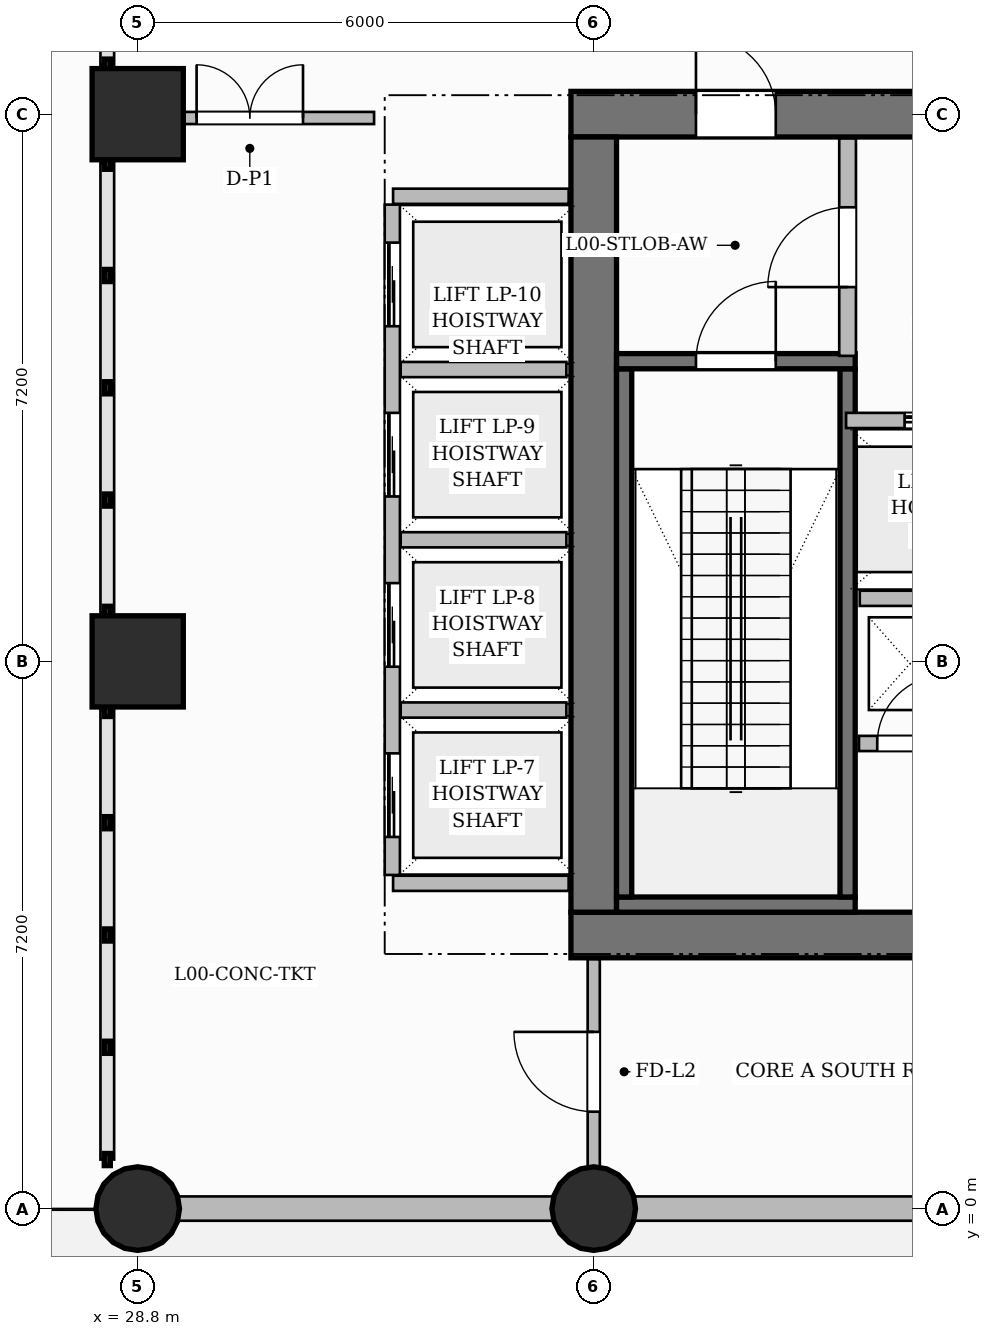
"""IFC4 building model, lengths in metres.
Left out: names, types, materials, properties, quantities, classifications, styles, units other than length and angle.
Written with IfcOpenShell. Run it as: python <this file> out.ifc"""

import sys

from ifc_helpers import new_model, si_unit, direction, frame, frame_2d, origin, origin_2d, place, context, subcontext, project, spatial, rectangle, circle, extrude, source, transform, mapped, element, fill, save


model = new_model("IFC4")
c1 = context("Model", 3, precision=1e-05, world=origin(), true_north=direction((0.0, 1.0)))
c2 = subcontext(c1, "Body", "Model", "MODEL_VIEW")
j1 = project(units=[si_unit("LENGTHUNIT", "METRE"), si_unit("PLANEANGLEUNIT", "RADIAN")], contexts=[c1])
p1 = place(None, origin())
s1 = spatial("IfcSite", under=j1, at=p1, CompositionType="ELEMENT")
p2 = place(p1, origin())
s2 = spatial("IfcBuilding", under=s1, at=p2, CompositionType="ELEMENT")
p3 = place(p2, origin())
s3 = spatial("IfcBuildingStorey", under=s2, at=p3, CompositionType="ELEMENT", Elevation=0.0)
p4 = place(p3, frame((34.5, 3.6, 0.0), z_axis=(0.0, 0.0, 1.0), x_axis=(1.0, 0.0, 0.0)))
e1 = element("IfcWall", 1, at=p4, inside=s3, PredefinedType="SHEAR", context=c2, shape_type="SweptSolid", body=[
    extrude(rectangle(XDim=15.6, YDim=0.6, at=frame_2d((7.8, 0.0))), origin(), (0.0, 0.0, 1.0), 5.4),
])
p5 = place(p4, frame((4.77, 0.0, 0.0)))
e2 = element("IfcOpeningElement", 2, at=p5, cuts=e1, PredefinedType="OPENING", context=c2, shape_type="SweptSolid", body=[
    extrude(rectangle(XDim=0.9, YDim=2.1, at=frame_2d((0.45, 1.05))), frame((0.0, 0.31, 0.0), z_axis=(0.0, -1.0, 0.0), x_axis=(1.0, 0.0, 0.0)), (0.0, 0.0, 1.0), 0.62),
])
p6 = place(p4, frame((7.15, 0.0, 0.0)))
e3 = element("IfcOpeningElement", 3, at=p6, cuts=e1, PredefinedType="OPENING", context=c2, shape_type="SweptSolid", body=[
    extrude(rectangle(XDim=0.9, YDim=2.1, at=frame_2d((0.45, 1.05))), frame((0.0, 0.31, 0.0), z_axis=(0.0, -1.0, 0.0), x_axis=(1.0, 0.0, 0.0)), (0.0, 0.0, 1.0), 0.62),
])
p7 = place(p3, frame((34.5, 14.4, 0.0), z_axis=(0.0, 0.0, 1.0), x_axis=(1.0, 0.0, 0.0)))
e4 = element("IfcWall", 4, at=p7, inside=s3, PredefinedType="SHEAR", context=c2, shape_type="SweptSolid", body=[
    extrude(rectangle(XDim=15.6, YDim=0.6, at=frame_2d((7.8, 0.0))), origin(), (0.0, 0.0, 1.0), 5.4),
])
p8 = place(p7, frame((5.43, 0.0, 0.0)))
e5 = element("IfcOpeningElement", 5, at=p8, cuts=e4, PredefinedType="OPENING", context=c2, shape_type="SweptSolid", body=[
    extrude(rectangle(XDim=1.5, YDim=2.2, at=frame_2d((0.75, 1.1))), frame((0.0, 0.31, 0.0), z_axis=(0.0, -1.0, 0.0), x_axis=(1.0, 0.0, 0.0)), (0.0, 0.0, 1.0), 0.62),
])
p9 = place(p7, frame((1.645, 0.0, 0.0)))
e6 = element("IfcOpeningElement", 6, at=p9, cuts=e4, PredefinedType="OPENING", context=c2, shape_type="SweptSolid", body=[
    extrude(rectangle(XDim=1.05, YDim=2.15, at=frame_2d((0.525, 1.075))), frame((0.0, 0.31, 0.0), z_axis=(0.0, -1.0, 0.0), x_axis=(1.0, 0.0, 0.0)), (0.0, 0.0, 1.0), 0.62),
])
p10 = place(p7, frame((11.275, 0.0, 0.0)))
e7 = element("IfcOpeningElement", 7, at=p10, cuts=e4, PredefinedType="OPENING", context=c2, shape_type="SweptSolid", body=[
    extrude(rectangle(XDim=1.05, YDim=2.15, at=frame_2d((0.525, 1.075))), frame((0.0, 0.31, 0.0), z_axis=(0.0, -1.0, 0.0), x_axis=(1.0, 0.0, 0.0)), (0.0, 0.0, 1.0), 0.62),
])
p11 = place(p3, frame((34.8, 3.9, 0.0), z_axis=(0.0, 0.0, 1.0), x_axis=(0.0, 1.0, 0.0)))
e8 = element("IfcWall", 8, at=p11, inside=s3, PredefinedType="SHEAR", context=c2, shape_type="SweptSolid", body=[
    extrude(rectangle(XDim=10.2, YDim=0.6, at=frame_2d((5.1, 0.0))), origin(), (0.0, 0.0, 1.0), 5.4),
])
m1 = source(origin(), c2, "Body", "SweptSolid", [
    extrude(circle(Radius=0.55, at=origin_2d()), origin(), (0.0, 0.0, 1.0), 5.4),
])
p12 = place(p3, frame((28.8, 0.0, 0.0), z_axis=(0.0, 0.0, 1.0), x_axis=(1.0, 0.0, 0.0)))
e9 = element("IfcColumn", 9, at=p12, inside=s3, PredefinedType="COLUMN", context=c2, shape_type="MappedRepresentation", body=[
    mapped(m1, transform((0.0, 0.0, 0.0), scale=1.0)),
])
m2 = source(origin(), c2, "Body", "SweptSolid", [
    extrude(rectangle(XDim=1.2, YDim=1.2, at=origin_2d()), origin(), (0.0, 0.0, 1.0), 5.4),
])
for number, where, z_axis, x_axis in (
    (10, (28.8, 7.2, 0.0), (0.0, 0.0, 1.0), (1.0, 0.0, 0.0)),
    (11, (28.8, 14.4, 0.0), (0.0, 0.0, 1.0), (1.0, 0.0, 0.0)),
):
    element("IfcColumn", number, at=place(p3, frame(where, z_axis=z_axis, x_axis=x_axis)), inside=s3, PredefinedType="COLUMN", context=c2, shape_type="MappedRepresentation", body=[
        mapped(m2, transform((0.0, 0.0, 0.0), scale=1.0)),
    ])
p13 = place(p3, frame((34.8, 0.0, 0.0), z_axis=(0.0, 0.0, 1.0), x_axis=(1.0, 0.0, 0.0)))
e12 = element("IfcColumn", 12, at=p13, inside=s3, PredefinedType="COLUMN", context=c2, shape_type="MappedRepresentation", body=[
    mapped(m1, transform((0.0, 0.0, 0.0), scale=1.0)),
])
p14 = place(p3, frame((35.1, 4.0, 0.0), z_axis=(0.0, 0.0, 1.0), x_axis=(1.0, 0.0, 0.0)))
e13 = element("IfcWall", 13, at=p14, inside=s3, PredefinedType="SHEAR", context=c2, shape_type="SweptSolid", body=[
    extrude(rectangle(XDim=3.14, YDim=0.2, at=frame_2d((1.57, 0.0))), origin(), (0.0, 0.0, 1.0), 5.4),
])
for number, where, z_axis, x_axis in (
    (14, (35.2, 4.1, 0.0), (0.0, 0.0, 1.0), (0.0, 1.0, 0.0)),
    (15, (38.14, 4.1, 0.0), (0.0, 0.0, 1.0), (0.0, 1.0, 0.0)),
):
    element("IfcWall", number, at=place(p3, frame(where, z_axis=z_axis, x_axis=x_axis)), inside=s3, PredefinedType="SHEAR", context=c2, shape_type="SweptSolid", body=[
        extrude(rectangle(XDim=6.95, YDim=0.2, at=frame_2d((3.475, 0.0))), origin(), (0.0, 0.0, 1.0), 5.4),
    ])
p15 = place(p3, frame((35.1, 11.15, 0.0), z_axis=(0.0, 0.0, 1.0), x_axis=(1.0, 0.0, 0.0)))
e16 = element("IfcWall", 16, at=p15, inside=s3, PredefinedType="SHEAR", context=c2, shape_type="SweptSolid", body=[
    extrude(rectangle(XDim=3.14, YDim=0.2, at=frame_2d((1.57, 0.0))), origin(), (0.0, 0.0, 1.0), 5.4),
])
p16 = place(p15, frame((1.045, 0.0, 0.0)))
e17 = element("IfcOpeningElement", 17, at=p16, cuts=e16, PredefinedType="OPENING", context=c2, shape_type="SweptSolid", body=[
    extrude(rectangle(XDim=1.05, YDim=2.2, at=frame_2d((0.525, 1.1))), frame((0.0, 0.11, 0.0), z_axis=(0.0, -1.0, 0.0), x_axis=(1.0, 0.0, 0.0)), (0.0, 0.0, 1.0), 0.22),
])
p17 = place(p3, frame((38.3, 8.03, 0.0), z_axis=(0.0, 0.0, 1.0), x_axis=(1.0, 0.0, 0.0)))
e18 = element("IfcWall", 18, at=p17, inside=s3, PredefinedType="PARTITIONING", context=c2, shape_type="SweptSolid", body=[
    extrude(rectangle(XDim=4.74, YDim=0.2, at=frame_2d((2.37, 0.0))), origin(), (0.0, 0.0, 1.0), 5.1),
])
p18 = place(p3, frame((38.14, 11.22, 0.0), z_axis=(0.0, 0.0, 1.0), x_axis=(0.0, 1.0, 0.0)))
e19 = element("IfcWall", 19, at=p18, inside=s3, PredefinedType="PARTITIONING", context=c2, shape_type="SweptSolid", body=[
    extrude(rectangle(XDim=2.86, YDim=0.22, at=frame_2d((1.43, 0.0))), origin(), (0.0, 0.0, 1.0), 5.1),
])
p19 = place(p18, frame((0.905, 0.0, 0.0)))
e20 = element("IfcOpeningElement", 20, at=p19, cuts=e19, PredefinedType="OPENING", context=c2, shape_type="SweptSolid", body=[
    extrude(rectangle(XDim=1.05, YDim=2.15, at=frame_2d((0.525, 1.075))), frame((0.0, 0.12, 0.0), z_axis=(0.0, -1.0, 0.0), x_axis=(1.0, 0.0, 0.0)), (0.0, 0.0, 1.0), 0.24),
])
p20 = place(p3, frame((38.29, 6.12, 0.0), z_axis=(0.0, 0.0, 1.0), x_axis=(1.0, 0.0, 0.0)))
e21 = element("IfcWall", 21, at=p20, inside=s3, PredefinedType="PARTITIONING", context=c2, shape_type="SweptSolid", body=[
    extrude(rectangle(XDim=1.38, YDim=0.2, at=frame_2d((0.69, 0.0))), origin(), (0.0, 0.0, 1.0), 5.1),
])
p21 = place(p20, frame((0.24, 0.0, 0.0)))
e22 = element("IfcOpeningElement", 22, at=p21, cuts=e21, PredefinedType="OPENING", context=c2, shape_type="SweptSolid", body=[
    extrude(rectangle(XDim=0.9, YDim=2.1, at=frame_2d((0.45, 1.05))), frame((0.0, 0.11, 0.0), z_axis=(0.0, -1.0, 0.0), x_axis=(1.0, 0.0, 0.0)), (0.0, 0.0, 1.0), 0.22),
])
for number, where, z_axis, x_axis in (
    (23, (32.16, 4.28, 0.0), (0.0, 0.0, 1.0), (1.0, 0.0, 0.0)),
    (24, (32.16, 13.32, 0.0), (0.0, 0.0, 1.0), (1.0, 0.0, 0.0)),
):
    element("IfcWall", number, at=place(p3, frame(where, z_axis=z_axis, x_axis=x_axis)), inside=s3, PredefinedType="PARTITIONING", context=c2, shape_type="SweptSolid", body=[
        extrude(rectangle(XDim=2.31, YDim=0.2, at=frame_2d((1.155, 0.0))), origin(), (0.0, 0.0, 1.0), 5.1),
    ])
p22 = place(p3, frame((32.15, 4.39, 0.0), z_axis=(0.0, 0.0, 1.0), x_axis=(0.0, 1.0, 0.0)))
e25 = element("IfcWall", 25, at=p22, inside=s3, PredefinedType="PARTITIONING", context=c2, shape_type="SweptSolid", body=[
    extrude(rectangle(XDim=8.82, YDim=0.2, at=frame_2d((4.41, 0.0))), origin(), (0.0, 0.0, 1.0), 5.1),
])
p23 = place(p22, frame((0.5, 0.0, 0.0)))
e26 = element("IfcOpeningElement", 26, at=p23, cuts=e25, PredefinedType="OPENING", context=c2, shape_type="SweptSolid", body=[
    extrude(rectangle(XDim=1.1, YDim=2.2, at=frame_2d((0.55, 1.1))), frame((0.0, 0.11, 0.0), z_axis=(0.0, -1.0, 0.0), x_axis=(1.0, 0.0, 0.0)), (0.0, 0.0, 1.0), 0.22),
])
p24 = place(p22, frame((2.74, 0.0, 0.0)))
e27 = element("IfcOpeningElement", 27, at=p24, cuts=e25, PredefinedType="OPENING", context=c2, shape_type="SweptSolid", body=[
    extrude(rectangle(XDim=1.1, YDim=2.2, at=frame_2d((0.55, 1.1))), frame((0.0, 0.11, 0.0), z_axis=(0.0, -1.0, 0.0), x_axis=(1.0, 0.0, 0.0)), (0.0, 0.0, 1.0), 0.22),
])
p25 = place(p22, frame((4.98, 0.0, 0.0)))
e28 = element("IfcOpeningElement", 28, at=p25, cuts=e25, PredefinedType="OPENING", context=c2, shape_type="SweptSolid", body=[
    extrude(rectangle(XDim=1.1, YDim=2.2, at=frame_2d((0.55, 1.1))), frame((0.0, 0.11, 0.0), z_axis=(0.0, -1.0, 0.0), x_axis=(1.0, 0.0, 0.0)), (0.0, 0.0, 1.0), 0.22),
])
p26 = place(p22, frame((7.22, 0.0, 0.0)))
e29 = element("IfcOpeningElement", 29, at=p26, cuts=e25, PredefinedType="OPENING", context=c2, shape_type="SweptSolid", body=[
    extrude(rectangle(XDim=1.1, YDim=2.2, at=frame_2d((0.55, 1.1))), frame((0.0, 0.11, 0.0), z_axis=(0.0, -1.0, 0.0), x_axis=(1.0, 0.0, 0.0)), (0.0, 0.0, 1.0), 0.22),
])
for number, where, z_axis, x_axis in (
    (30, (32.26, 6.56, 0.0), (0.0, 0.0, 1.0), (1.0, 0.0, 0.0)),
    (31, (32.26, 8.8, 0.0), (0.0, 0.0, 1.0), (1.0, 0.0, 0.0)),
    (32, (32.26, 11.04, 0.0), (0.0, 0.0, 1.0), (1.0, 0.0, 0.0)),
):
    element("IfcWall", number, at=place(p3, frame(where, z_axis=z_axis, x_axis=x_axis)), inside=s3, PredefinedType="PARTITIONING", context=c2, shape_type="SweptSolid", body=[
        extrude(rectangle(XDim=2.18, YDim=0.2, at=frame_2d((1.09, 0.0))), origin(), (0.0, 0.0, 1.0), 5.1),
    ])
p27 = place(p3, frame((34.8, 0.32, 0.0), z_axis=(0.0, 0.0, 1.0), x_axis=(0.0, 1.0, 0.0)))
e33 = element("IfcWall", 33, at=p27, inside=s3, PredefinedType="PARTITIONING", context=c2, shape_type="SweptSolid", body=[
    extrude(rectangle(XDim=2.96, YDim=0.16, at=frame_2d((1.48, 0.0))), origin(), (0.0, 0.0, 1.0), 5.1),
])
p28 = place(p27, frame((0.955, 0.0, 0.0)))
e34 = element("IfcOpeningElement", 34, at=p28, cuts=e33, PredefinedType="OPENING", context=c2, shape_type="SweptSolid", body=[
    extrude(rectangle(XDim=1.05, YDim=2.15, at=frame_2d((0.525, 1.075))), frame((0.0, 0.09, 0.0), z_axis=(0.0, -1.0, 0.0), x_axis=(1.0, 0.0, 0.0)), (0.0, 0.0, 1.0), 0.18),
])
p29 = place(p3, frame((28.64, 14.35, 0.0), z_axis=(0.0, 0.0, 1.0), x_axis=(1.0, 0.0, 0.0)))
e35 = element("IfcWall", 35, at=p29, inside=s3, PredefinedType="PARTITIONING", context=c2, shape_type="SweptSolid", body=[
    extrude(rectangle(XDim=3.27, YDim=0.16, at=frame_2d((1.635, 0.0))), origin(), (0.0, 0.0, 1.0), 4.085),
])
p30 = place(p29, frame((0.935, 0.0, 0.0)))
e36 = element("IfcOpeningElement", 36, at=p30, cuts=e35, PredefinedType="OPENING", context=c2, shape_type="SweptSolid", body=[
    extrude(rectangle(XDim=1.4, YDim=2.35, at=frame_2d((0.7, 1.175))), frame((0.0, 0.09, 0.0), z_axis=(0.0, -1.0, 0.0), x_axis=(1.0, 0.0, 0.0)), (0.0, 0.0, 1.0), 0.18),
])
p31 = place(p3, frame((38.12, 10.37, 0.0), z_axis=(0.0, 0.0, 1.0), x_axis=(1.0, 0.0, 0.0)))
e37 = element("IfcWall", 37, at=p31, inside=s3, PredefinedType="PARTITIONING", context=c2, shape_type="SweptSolid", body=[
    extrude(rectangle(XDim=2.64, YDim=0.2, at=frame_2d((1.32, 0.0))), origin(), (0.0, 0.0, 1.0), 5.1),
])
p32 = place(p31, frame((0.77, 0.0, 0.0)))
e38 = element("IfcOpeningElement", 38, at=p32, cuts=e37, PredefinedType="OPENING", context=c2, shape_type="SweptSolid", body=[
    extrude(rectangle(XDim=1.1, YDim=2.2, at=frame_2d((0.55, 1.1))), frame((0.0, 0.11, 0.0), z_axis=(0.0, -1.0, 0.0), x_axis=(1.0, 0.0, 0.0)), (0.0, 0.0, 1.0), 0.22),
])
p33 = place(p3, frame((28.35, 0.0, 0.0), z_axis=(0.0, 0.0, 1.0), x_axis=(1.0, 0.0, 0.0)))
e39 = element("IfcWall", 39, at=p33, inside=s3, PredefinedType="SOLIDWALL", context=c2, shape_type="SweptSolid", body=[
    extrude(rectangle(XDim=52.05, YDim=0.32, at=frame_2d((26.025, 0.0))), origin(), (0.0, 0.0, 1.0), 4.085),
])
p34 = place(p33, frame((24.8, 0.0, 0.0)))
e40 = element("IfcOpeningElement", 40, at=p34, cuts=e39, PredefinedType="OPENING", context=c2, shape_type="SweptSolid", body=[
    extrude(rectangle(XDim=1.1, YDim=2.2, at=frame_2d((0.55, 1.1))), frame((0.0, 0.17, 0.0), z_axis=(0.0, -1.0, 0.0), x_axis=(1.0, 0.0, 0.0)), (0.0, 0.0, 1.0), 0.34),
])
p35 = place(p33, frame((33.65, 0.0, 0.0)))
e41 = element("IfcOpeningElement", 41, at=p35, cuts=e39, PredefinedType="OPENING", context=c2, shape_type="SweptSolid", body=[
    extrude(rectangle(XDim=2.4, YDim=2.8, at=frame_2d((1.2, 1.4))), frame((0.0, 0.17, 0.0), z_axis=(0.0, -1.0, 0.0), x_axis=(1.0, 0.0, 0.0)), (0.0, 0.0, 1.0), 0.34),
])
m3 = source(origin(), c2, "Body", "SweptSolid", [
    extrude(rectangle(XDim=1.05, YDim=2.2, at=frame_2d((0.525, 1.1))), frame((0.0, 0.025, 0.0), z_axis=(0.0, -1.0, 0.0), x_axis=(1.0, 0.0, 0.0)), (0.0, 0.0, 1.0), 0.05),
])
p36 = place(p16, origin())
e42 = element("IfcDoor", 42, at=p36, inside=s3, OperationType="SINGLE_SWING_RIGHT", PredefinedType="DOOR", context=c2, shape_type="MappedRepresentation", body=[
    mapped(m3, transform((0.0, 0.0, 0.0), scale=1.0)),
])
fill(e17, e42)
m4 = source(origin(), c2, "Body", "SweptSolid", [
    extrude(rectangle(XDim=1.05, YDim=2.15, at=frame_2d((0.525, 1.075))), frame((0.0, 0.025, 0.0), z_axis=(0.0, -1.0, 0.0), x_axis=(1.0, 0.0, 0.0)), (0.0, 0.0, 1.0), 0.05),
])
p37 = place(p19, origin())
e43 = element("IfcDoor", 43, at=p37, inside=s3, OperationType="SINGLE_SWING_LEFT", PredefinedType="DOOR", context=c2, shape_type="MappedRepresentation", body=[
    mapped(m4, transform((0.0, 0.0, 0.0), scale=1.0)),
])
fill(e20, e43)
p38 = place(p9, origin())
e44 = element("IfcDoor", 44, at=p38, inside=s3, OperationType="SINGLE_SWING_LEFT", PredefinedType="DOOR", context=c2, shape_type="MappedRepresentation", body=[
    mapped(m4, transform((0.0, 0.0, 0.0), scale=1.0)),
])
fill(e6, e44)
m5 = source(origin(), c2, "Body", "SweptSolid", [
    extrude(rectangle(XDim=0.9, YDim=2.1, at=frame_2d((0.45, 1.05))), frame((0.0, 0.025, 0.0), z_axis=(0.0, -1.0, 0.0), x_axis=(1.0, 0.0, 0.0)), (0.0, 0.0, 1.0), 0.05),
])
p39 = place(p21, origin())
e45 = element("IfcDoor", 45, at=p39, inside=s3, OperationType="SINGLE_SWING_RIGHT", PredefinedType="DOOR", context=c2, shape_type="MappedRepresentation", body=[
    mapped(m5, transform((0.0, 0.0, 0.0), scale=1.0)),
])
fill(e22, e45)
p40 = place(p28, origin())
e46 = element("IfcDoor", 46, at=p40, inside=s3, OperationType="SINGLE_SWING_RIGHT", PredefinedType="DOOR", context=c2, shape_type="MappedRepresentation", body=[
    mapped(m4, transform((0.0, 0.0, 0.0), scale=1.0)),
])
fill(e34, e46)
m6 = source(origin(), c2, "Body", "SweptSolid", [
    extrude(rectangle(XDim=1.4, YDim=2.35, at=frame_2d((0.7, 1.175))), frame((0.0, 0.025, 0.0), z_axis=(0.0, -1.0, 0.0), x_axis=(1.0, 0.0, 0.0)), (0.0, 0.0, 1.0), 0.05),
])
p41 = place(p30, origin())
e47 = element("IfcDoor", 47, at=p41, inside=s3, OperationType="DOUBLE_DOOR_SINGLE_SWING", PredefinedType="DOOR", context=c2, shape_type="MappedRepresentation", body=[
    mapped(m6, transform((0.0, 0.0, 0.0), scale=1.0)),
])
fill(e36, e47)
m7 = source(origin(), c2, "Body", "SweptSolid", [
    extrude(rectangle(XDim=1.1, YDim=2.2, at=frame_2d((0.55, 1.1))), frame((0.0, 0.025, 0.0), z_axis=(0.0, -1.0, 0.0), x_axis=(1.0, 0.0, 0.0)), (0.0, 0.0, 1.0), 0.05),
])
p42 = place(p32, origin())
e48 = element("IfcDoor", 48, at=p42, inside=s3, OperationType="SLIDING_TO_LEFT", PredefinedType="DOOR", context=c2, shape_type="MappedRepresentation", body=[
    mapped(m7, transform((0.0, 0.0, 0.0), scale=1.0)),
])
fill(e38, e48)
p43 = place(p23, origin())
e49 = element("IfcDoor", 49, at=p43, inside=s3, OperationType="SLIDING_TO_LEFT", PredefinedType="DOOR", context=c2, shape_type="MappedRepresentation", body=[
    mapped(m7, transform((0.0, 0.0, 0.0), scale=1.0)),
])
fill(e26, e49)
p44 = place(p24, origin())
e50 = element("IfcDoor", 50, at=p44, inside=s3, OperationType="SLIDING_TO_LEFT", PredefinedType="DOOR", context=c2, shape_type="MappedRepresentation", body=[
    mapped(m7, transform((0.0, 0.0, 0.0), scale=1.0)),
])
fill(e27, e50)
p45 = place(p25, origin())
e51 = element("IfcDoor", 51, at=p45, inside=s3, OperationType="SLIDING_TO_LEFT", PredefinedType="DOOR", context=c2, shape_type="MappedRepresentation", body=[
    mapped(m7, transform((0.0, 0.0, 0.0), scale=1.0)),
])
fill(e28, e51)
p46 = place(p26, origin())
e52 = element("IfcDoor", 52, at=p46, inside=s3, OperationType="SLIDING_TO_LEFT", PredefinedType="DOOR", context=c2, shape_type="MappedRepresentation", body=[
    mapped(m7, transform((0.0, 0.0, 0.0), scale=1.0)),
])
fill(e29, e52)
save(model, sys.argv[1])
